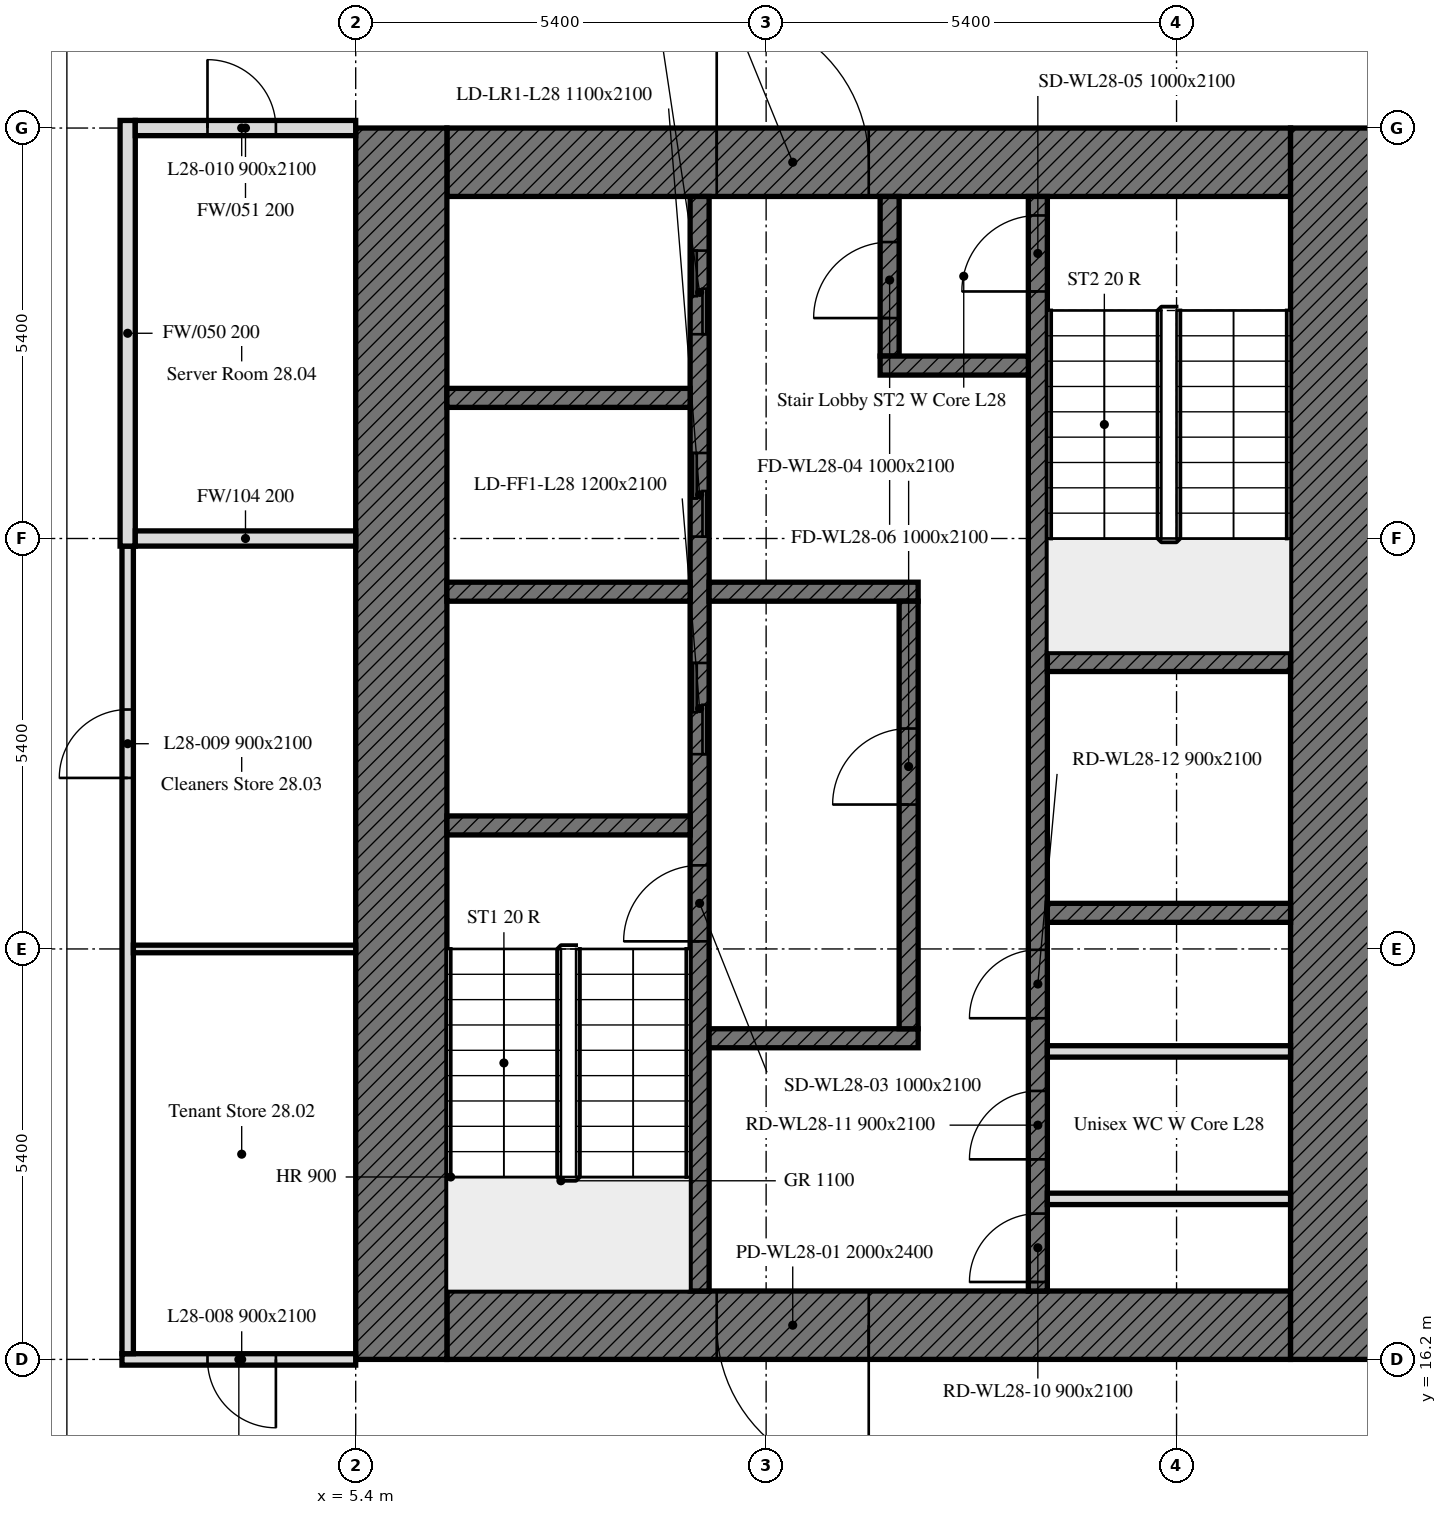
"""IFC4 building model, lengths in metres.
Left out: names, types, materials, properties, quantities, classifications, styles, units other than length and angle.
Written with IfcOpenShell. Run it as: python <this file> out.ifc"""

import sys

from ifc_helpers import new_model, si_unit, direction, frame, frame_2d, origin, place, context, subcontext, project, spatial, rectangle, extrude, element, fill, save


model = new_model("IFC4")
c1 = context("Model", 3, precision=1e-05, world=origin(), true_north=direction((0.0, 1.0)))
c2 = subcontext(c1, "Body", "Model", "MODEL_VIEW")
j1 = project(units=[si_unit("LENGTHUNIT", "METRE"), si_unit("PLANEANGLEUNIT", "RADIAN")], contexts=[c1])
p1 = place(None, origin())
s1 = spatial("IfcSite", under=j1, at=p1, CompositionType="ELEMENT")
p2 = place(p1, origin())
s2 = spatial("IfcBuilding", under=s1, at=p2, CompositionType="ELEMENT")
p3 = place(p2, frame((0.0, 0.0, 118.2)))
s3 = spatial("IfcBuildingStorey", under=s2, at=p3, CompositionType="ELEMENT", Elevation=118.2)
p4 = place(p3, frame((17.7, 16.65, 0.0), z_axis=(0.0, 0.0, 1.0), x_axis=(-1.0, 0.0, 0.0)))
e1 = element("IfcWall", 1, at=p4, inside=s3, PredefinedType="SOLIDWALL", context=c2, shape_type="SweptSolid", body=[
    extrude(rectangle(XDim=11.1, YDim=0.9, at=frame_2d((5.55, 0.0))), origin(), (0.0, 0.0, 1.0), 3.5),
])
p5 = place(p4, frame((5.55, 0.0, 0.0)))
e2 = element("IfcOpeningElement", 2, at=p5, cuts=e1, PredefinedType="OPENING", context=c2, shape_type="SweptSolid", body=[
    extrude(rectangle(XDim=2.0, YDim=2.4, at=frame_2d((1.0, 1.2))), frame((0.0, 0.45, 0.0), z_axis=(0.0, -1.0, 0.0), x_axis=(1.0, 0.0, 0.0)), (0.0, 0.0, 1.0), 0.9),
])
p6 = place(p3, frame((6.6, 31.95, 0.0), z_axis=(0.0, 0.0, 1.0), x_axis=(1.0, 0.0, 0.0)))
e3 = element("IfcWall", 3, at=p6, inside=s3, PredefinedType="SOLIDWALL", context=c2, shape_type="SweptSolid", body=[
    extrude(rectangle(XDim=11.1, YDim=0.9, at=frame_2d((5.55, 0.0))), origin(), (0.0, 0.0, 1.0), 3.5),
])
p7 = place(p6, frame((3.55, 0.0, 0.0)))
e4 = element("IfcOpeningElement", 4, at=p7, cuts=e3, PredefinedType="OPENING", context=c2, shape_type="SweptSolid", body=[
    extrude(rectangle(XDim=2.0, YDim=2.4, at=frame_2d((1.0, 1.2))), frame((0.0, 0.45, 0.0), z_axis=(0.0, -1.0, 0.0), x_axis=(1.0, 0.0, 0.0)), (0.0, 0.0, 1.0), 0.9),
])
for number, where, z_axis, x_axis in (
    (5, (6.0, 16.2, 0.0), (0.0, 0.0, 1.0), (0.0, 1.0, 0.0)),
    (6, (18.3, 32.4, 0.0), (0.0, 0.0, 1.0), (0.0, -1.0, 0.0)),
):
    element("IfcWall", number, at=place(p3, frame(where, z_axis=z_axis, x_axis=x_axis)), inside=s3, PredefinedType="SOLIDWALL", context=c2, shape_type="SweptSolid", body=[
        extrude(rectangle(XDim=16.2, YDim=1.2, at=frame_2d((8.1, 0.0))), origin(), (0.0, 0.0, 1.0), 3.5),
    ])
p8 = place(p3, frame((9.925, 17.1, 0.0), z_axis=(0.0, 0.0, 1.0), x_axis=(0.0, 1.0, 0.0)))
e7 = element("IfcWall", 7, at=p8, inside=s3, PredefinedType="SOLIDWALL", context=c2, shape_type="SweptSolid", body=[
    extrude(rectangle(XDim=14.4, YDim=0.25, at=frame_2d((7.2, 0.0))), origin(), (0.0, 0.0, 1.0), 3.5),
])
p9 = place(p8, frame((4.6, 0.0, 0.0)))
e8 = element("IfcOpeningElement", 8, at=p9, cuts=e7, PredefinedType="OPENING", context=c2, shape_type="SweptSolid", body=[
    extrude(rectangle(XDim=1.0, YDim=2.1, at=frame_2d((0.5, 1.05))), frame((0.0, 0.125, 0.0), z_axis=(0.0, -1.0, 0.0), x_axis=(1.0, 0.0, 0.0)), (0.0, 0.0, 1.0), 0.25),
])
p10 = place(p8, frame((7.062, 0.0, 0.0)))
e9 = element("IfcOpeningElement", 9, at=p10, cuts=e7, PredefinedType="OPENING", context=c2, shape_type="SweptSolid", body=[
    extrude(rectangle(XDim=1.2, YDim=2.1, at=frame_2d((0.6, 1.05))), frame((0.0, 0.125, 0.0), z_axis=(0.0, -1.0, 0.0), x_axis=(1.0, 0.0, 0.0)), (0.0, 0.0, 1.0), 0.25),
])
p11 = place(p8, frame((9.925, 0.0, 0.0)))
e10 = element("IfcOpeningElement", 10, at=p11, cuts=e7, PredefinedType="OPENING", context=c2, shape_type="SweptSolid", body=[
    extrude(rectangle(XDim=1.1, YDim=2.1, at=frame_2d((0.55, 1.05))), frame((0.0, 0.125, 0.0), z_axis=(0.0, -1.0, 0.0), x_axis=(1.0, 0.0, 0.0)), (0.0, 0.0, 1.0), 0.25),
])
p12 = place(p8, frame((12.587, 0.0, 0.0)))
e11 = element("IfcOpeningElement", 11, at=p12, cuts=e7, PredefinedType="OPENING", context=c2, shape_type="SweptSolid", body=[
    extrude(rectangle(XDim=1.1, YDim=2.1, at=frame_2d((0.55, 1.05))), frame((0.0, 0.125, 0.0), z_axis=(0.0, -1.0, 0.0), x_axis=(1.0, 0.0, 0.0)), (0.0, 0.0, 1.0), 0.25),
])
p13 = place(p3, frame((14.375, 17.1, 0.0), z_axis=(0.0, 0.0, 1.0), x_axis=(0.0, 1.0, 0.0)))
e12 = element("IfcWall", 12, at=p13, inside=s3, PredefinedType="SOLIDWALL", context=c2, shape_type="SweptSolid", body=[
    extrude(rectangle(XDim=14.4, YDim=0.25, at=frame_2d((7.2, 0.0))), origin(), (0.0, 0.0, 1.0), 3.5),
])
p14 = place(p13, frame((13.15, 0.0, 0.0)))
e13 = element("IfcOpeningElement", 13, at=p14, cuts=e12, PredefinedType="OPENING", context=c2, shape_type="SweptSolid", body=[
    extrude(rectangle(XDim=1.0, YDim=2.1, at=frame_2d((0.5, 1.05))), frame((0.0, 0.125, 0.0), z_axis=(0.0, -1.0, 0.0), x_axis=(1.0, 0.0, 0.0)), (0.0, 0.0, 1.0), 0.25),
])
p15 = place(p13, frame((0.118, 0.0, 0.0)))
e14 = element("IfcOpeningElement", 14, at=p15, cuts=e12, PredefinedType="OPENING", context=c2, shape_type="SweptSolid", body=[
    extrude(rectangle(XDim=0.9, YDim=2.1, at=frame_2d((0.45, 1.05))), frame((0.0, 0.125, 0.0), z_axis=(0.0, -1.0, 0.0), x_axis=(1.0, 0.0, 0.0)), (0.0, 0.0, 1.0), 0.25),
])
p16 = place(p13, frame((1.732, 0.0, 0.0)))
e15 = element("IfcOpeningElement", 15, at=p16, cuts=e12, PredefinedType="OPENING", context=c2, shape_type="SweptSolid", body=[
    extrude(rectangle(XDim=0.9, YDim=2.1, at=frame_2d((0.45, 1.05))), frame((0.0, 0.125, 0.0), z_axis=(0.0, -1.0, 0.0), x_axis=(1.0, 0.0, 0.0)), (0.0, 0.0, 1.0), 0.25),
])
p17 = place(p13, frame((3.588, 0.0, 0.0)))
e16 = element("IfcOpeningElement", 16, at=p17, cuts=e12, PredefinedType="OPENING", context=c2, shape_type="SweptSolid", body=[
    extrude(rectangle(XDim=0.9, YDim=2.1, at=frame_2d((0.45, 1.05))), frame((0.0, 0.125, 0.0), z_axis=(0.0, -1.0, 0.0), x_axis=(1.0, 0.0, 0.0)), (0.0, 0.0, 1.0), 0.25),
])
for number, where, z_axis, x_axis in (
    (17, (6.6, 23.225, 0.0), (0.0, 0.0, 1.0), (1.0, 0.0, 0.0)),
    (18, (14.5, 25.375, 0.0), (0.0, 0.0, 1.0), (1.0, 0.0, 0.0)),
    (19, (14.5, 22.075, 0.0), (0.0, 0.0, 1.0), (1.0, 0.0, 0.0)),
    (20, (6.6, 26.3, 0.0), (0.0, 0.0, 1.0), (1.0, 0.0, 0.0)),
):
    element("IfcWall", number, at=place(p3, frame(where, z_axis=z_axis, x_axis=x_axis)), inside=s3, PredefinedType="SOLIDWALL", context=c2, shape_type="SweptSolid", body=[
        extrude(rectangle(XDim=3.2, YDim=0.25, at=frame_2d((1.6, 0.0))), origin(), (0.0, 0.0, 1.0), 3.5),
    ])
for number, where, z_axis, x_axis in (
    (21, (10.05, 26.3, 0.0), (0.0, 0.0, 1.0), (1.0, 0.0, 0.0)),
    (22, (10.05, 20.425, 0.0), (0.0, 0.0, 1.0), (1.0, 0.0, 0.0)),
):
    element("IfcWall", number, at=place(p3, frame(where, z_axis=z_axis, x_axis=x_axis)), inside=s3, PredefinedType="SOLIDWALL", context=c2, shape_type="SweptSolid", body=[
        extrude(rectangle(XDim=2.75, YDim=0.25, at=frame_2d((1.375, 0.0))), origin(), (0.0, 0.0, 1.0), 3.5),
    ])
p18 = place(p3, frame((12.425, 29.4, 0.0), z_axis=(0.0, 0.0, 1.0), x_axis=(0.0, 1.0, 0.0)))
e23 = element("IfcWall", 23, at=p18, inside=s3, PredefinedType="SOLIDWALL", context=c2, shape_type="SweptSolid", body=[
    extrude(rectangle(XDim=2.1, YDim=0.25, at=frame_2d((1.05, 0.0))), origin(), (0.0, 0.0, 1.0), 3.5),
])
p19 = place(p18, frame((0.5, 0.0, 0.0)))
e24 = element("IfcOpeningElement", 24, at=p19, cuts=e23, PredefinedType="OPENING", context=c2, shape_type="SweptSolid", body=[
    extrude(rectangle(XDim=1.0, YDim=2.1, at=frame_2d((0.5, 1.05))), frame((0.0, 0.125, 0.0), z_axis=(0.0, -1.0, 0.0), x_axis=(1.0, 0.0, 0.0)), (0.0, 0.0, 1.0), 0.25),
])
p20 = place(p3, frame((12.3, 29.275, 0.0), z_axis=(0.0, 0.0, 1.0), x_axis=(1.0, 0.0, 0.0)))
e25 = element("IfcWall", 25, at=p20, inside=s3, PredefinedType="SOLIDWALL", context=c2, shape_type="SweptSolid", body=[
    extrude(rectangle(XDim=1.95, YDim=0.25, at=frame_2d((0.975, 0.0))), origin(), (0.0, 0.0, 1.0), 3.5),
])
p21 = place(p3, frame((12.675, 20.55, 0.0), z_axis=(0.0, 0.0, 1.0), x_axis=(0.0, 1.0, 0.0)))
e26 = element("IfcWall", 26, at=p21, inside=s3, PredefinedType="SOLIDWALL", context=c2, shape_type="SweptSolid", body=[
    extrude(rectangle(XDim=5.625, YDim=0.25, at=frame_2d((2.812, 0.0))), origin(), (0.0, 0.0, 1.0), 3.5),
])
p22 = place(p21, frame((2.95, 0.0, 0.0)))
e27 = element("IfcOpeningElement", 27, at=p22, cuts=e26, PredefinedType="OPENING", context=c2, shape_type="SweptSolid", body=[
    extrude(rectangle(XDim=1.0, YDim=2.1, at=frame_2d((0.5, 1.05))), frame((0.0, 0.125, 0.0), z_axis=(0.0, -1.0, 0.0), x_axis=(1.0, 0.0, 0.0)), (0.0, 0.0, 1.0), 0.25),
])
p23 = place(p3, frame((6.6, 28.85, 0.0), z_axis=(0.0, 0.0, 1.0), x_axis=(1.0, 0.0, 0.0)))
e28 = element("IfcWall", 28, at=p23, inside=s3, PredefinedType="SOLIDWALL", context=c2, shape_type="SweptSolid", body=[
    extrude(rectangle(XDim=3.2, YDim=0.25, at=frame_2d((1.6, 0.0))), origin(), (0.0, 0.0, 1.0), 3.5),
])
for number, where, z_axis, x_axis in (
    (29, (14.5, 18.312, 0.0), (0.0, 0.0, 1.0), (1.0, 0.0, 0.0)),
    (30, (14.5, 20.252, 0.0), (0.0, 0.0, 1.0), (1.0, 0.0, 0.0)),
):
    element("IfcWall", number, at=place(p3, frame(where, z_axis=z_axis, x_axis=x_axis)), inside=s3, PredefinedType="PARTITIONING", context=c2, shape_type="SweptSolid", body=[
        extrude(rectangle(XDim=3.2, YDim=0.15, at=frame_2d((1.6, 0.0))), origin(), (0.0, 0.0, 1.0), 3.5),
    ])
p24 = place(p3, frame((5.4, 16.2, 0.0), z_axis=(0.0, 0.0, 1.0), x_axis=(-1.0, 0.0, 0.0)))
e31 = element("IfcWall", 31, at=p24, inside=s3, PredefinedType="PARTITIONING", context=c2, shape_type="SweptSolid", body=[
    extrude(rectangle(XDim=3.075, YDim=0.15, at=frame_2d((1.538, 0.0))), origin(), (0.0, 0.0, 1.0), 2.75),
])
p25 = place(p24, frame((1.05, 0.0, 0.0)))
e32 = element("IfcOpeningElement", 32, at=p25, cuts=e31, PredefinedType="OPENING", context=c2, shape_type="SweptSolid", body=[
    extrude(rectangle(XDim=0.9, YDim=2.1, at=frame_2d((0.45, 1.05))), frame((0.0, 0.075, 0.0), z_axis=(0.0, -1.0, 0.0), x_axis=(1.0, 0.0, 0.0)), (0.0, 0.0, 1.0), 0.15),
])
p26 = place(p3, frame((2.4, 16.275, 0.0), z_axis=(0.0, 0.0, 1.0), x_axis=(0.0, 1.0, 0.0)))
e33 = element("IfcWall", 33, at=p26, inside=s3, PredefinedType="PARTITIONING", context=c2, shape_type="SweptSolid", body=[
    extrude(rectangle(XDim=10.625, YDim=0.15, at=frame_2d((5.312, 0.0))), origin(), (0.0, 0.0, 1.0), 3.5),
])
p27 = place(p26, frame((7.575, 0.0, 0.0)))
e34 = element("IfcOpeningElement", 34, at=p27, cuts=e33, PredefinedType="OPENING", context=c2, shape_type="SweptSolid", body=[
    extrude(rectangle(XDim=0.9, YDim=2.1, at=frame_2d((0.45, 1.05))), frame((0.0, 0.075, 0.0), z_axis=(0.0, -1.0, 0.0), x_axis=(1.0, 0.0, 0.0)), (0.0, 0.0, 1.0), 0.15),
])
p28 = place(p3, frame((2.4, 26.9, 0.0), z_axis=(0.0, 0.0, 1.0), x_axis=(0.0, 1.0, 0.0)))
e35 = element("IfcWall", 35, at=p28, inside=s3, PredefinedType="PARTITIONING", context=c2, shape_type="SweptSolid", body=[
    extrude(rectangle(XDim=5.6, YDim=0.2, at=frame_2d((2.8, 0.0))), origin(), (0.0, 0.0, 1.0), 3.5),
])
p29 = place(p3, frame((2.5, 32.4, 0.0), z_axis=(0.0, 0.0, 1.0), x_axis=(1.0, 0.0, 0.0)))
e36 = element("IfcWall", 36, at=p29, inside=s3, PredefinedType="PARTITIONING", context=c2, shape_type="SweptSolid", body=[
    extrude(rectangle(XDim=2.9, YDim=0.2, at=frame_2d((1.45, 0.0))), origin(), (0.0, 0.0, 1.0), 2.75),
])
p30 = place(p29, frame((0.95, 0.0, 0.0)))
e37 = element("IfcOpeningElement", 37, at=p30, cuts=e36, PredefinedType="OPENING", context=c2, shape_type="SweptSolid", body=[
    extrude(rectangle(XDim=0.9, YDim=2.1, at=frame_2d((0.45, 1.05))), frame((0.0, 0.1, 0.0), z_axis=(0.0, -1.0, 0.0), x_axis=(1.0, 0.0, 0.0)), (0.0, 0.0, 1.0), 0.2),
])
p31 = place(p3, frame((5.4, 21.6, 0.0), z_axis=(0.0, 0.0, 1.0), x_axis=(-1.0, 0.0, 0.0)))
e38 = element("IfcWall", 38, at=p31, inside=s3, PredefinedType="PARTITIONING", context=c2, shape_type="SweptSolid", body=[
    extrude(rectangle(XDim=2.925, YDim=0.1, at=frame_2d((1.462, 0.0))), origin(), (0.0, 0.0, 1.0), 2.75),
])
p32 = place(p3, frame((5.4, 27.0, 0.0), z_axis=(0.0, 0.0, 1.0), x_axis=(-1.0, 0.0, 0.0)))
e39 = element("IfcWall", 39, at=p32, inside=s3, PredefinedType="PARTITIONING", context=c2, shape_type="SweptSolid", body=[
    extrude(rectangle(XDim=2.9, YDim=0.2, at=frame_2d((1.45, 0.0))), origin(), (0.0, 0.0, 1.0), 2.75),
])
p33 = place(p5, origin())
e40 = element("IfcDoor", 40, at=p33, inside=s3, OperationType="DOUBLE_DOOR_SINGLE_SWING", PredefinedType="DOOR", context=c2, shape_type="SweptSolid", body=[
    extrude(rectangle(XDim=2.0, YDim=2.4, at=frame_2d((1.0, 1.2))), frame((0.0, 0.025, 0.0), z_axis=(0.0, -1.0, 0.0), x_axis=(1.0, 0.0, 0.0)), (0.0, 0.0, 1.0), 0.05),
])
fill(e2, e40)
p34 = place(p7, origin())
e41 = element("IfcDoor", 41, at=p34, inside=s3, OperationType="DOUBLE_DOOR_SINGLE_SWING", PredefinedType="DOOR", context=c2, shape_type="SweptSolid", body=[
    extrude(rectangle(XDim=2.0, YDim=2.4, at=frame_2d((1.0, 1.2))), frame((0.0, 0.025, 0.0), z_axis=(0.0, -1.0, 0.0), x_axis=(1.0, 0.0, 0.0)), (0.0, 0.0, 1.0), 0.05),
])
fill(e4, e41)
p35 = place(p9, origin())
e42 = element("IfcDoor", 42, at=p35, inside=s3, OperationType="SINGLE_SWING_LEFT", PredefinedType="DOOR", context=c2, shape_type="SweptSolid", body=[
    extrude(rectangle(XDim=1.0, YDim=2.1, at=frame_2d((0.5, 1.05))), frame((0.0, 0.025, 0.0), z_axis=(0.0, -1.0, 0.0), x_axis=(1.0, 0.0, 0.0)), (0.0, 0.0, 1.0), 0.05),
])
fill(e8, e42)
p36 = place(p22, origin())
e43 = element("IfcDoor", 43, at=p36, inside=s3, OperationType="SINGLE_SWING_LEFT", PredefinedType="DOOR", context=c2, shape_type="SweptSolid", body=[
    extrude(rectangle(XDim=1.0, YDim=2.1, at=frame_2d((0.5, 1.05))), frame((0.0, 0.025, 0.0), z_axis=(0.0, -1.0, 0.0), x_axis=(1.0, 0.0, 0.0)), (0.0, 0.0, 1.0), 0.05),
])
fill(e27, e43)
p37 = place(p14, origin())
e44 = element("IfcDoor", 44, at=p37, inside=s3, OperationType="SINGLE_SWING_LEFT", PredefinedType="DOOR", context=c2, shape_type="SweptSolid", body=[
    extrude(rectangle(XDim=1.0, YDim=2.1, at=frame_2d((0.5, 1.05))), frame((0.0, 0.025, 0.0), z_axis=(0.0, -1.0, 0.0), x_axis=(1.0, 0.0, 0.0)), (0.0, 0.0, 1.0), 0.05),
])
fill(e13, e44)
p38 = place(p19, origin())
e45 = element("IfcDoor", 45, at=p38, inside=s3, OperationType="SINGLE_SWING_LEFT", PredefinedType="DOOR", context=c2, shape_type="SweptSolid", body=[
    extrude(rectangle(XDim=1.0, YDim=2.1, at=frame_2d((0.5, 1.05))), frame((0.0, 0.025, 0.0), z_axis=(0.0, -1.0, 0.0), x_axis=(1.0, 0.0, 0.0)), (0.0, 0.0, 1.0), 0.05),
])
fill(e24, e45)
p39 = place(p10, origin())
e46 = element("IfcDoor", 46, at=p39, inside=s3, OperationType="DOUBLE_DOOR_SLIDING", PredefinedType="DOOR", context=c2, shape_type="SweptSolid", body=[
    extrude(rectangle(XDim=1.2, YDim=2.1, at=frame_2d((0.6, 1.05))), frame((0.0, 0.025, 0.0), z_axis=(0.0, -1.0, 0.0), x_axis=(1.0, 0.0, 0.0)), (0.0, 0.0, 1.0), 0.05),
])
fill(e9, e46)
p40 = place(p11, origin())
e47 = element("IfcDoor", 47, at=p40, inside=s3, OperationType="DOUBLE_DOOR_SLIDING", PredefinedType="DOOR", context=c2, shape_type="SweptSolid", body=[
    extrude(rectangle(XDim=1.1, YDim=2.1, at=frame_2d((0.55, 1.05))), frame((0.0, 0.025, 0.0), z_axis=(0.0, -1.0, 0.0), x_axis=(1.0, 0.0, 0.0)), (0.0, 0.0, 1.0), 0.05),
])
fill(e10, e47)
p41 = place(p12, origin())
e48 = element("IfcDoor", 48, at=p41, inside=s3, OperationType="DOUBLE_DOOR_SLIDING", PredefinedType="DOOR", context=c2, shape_type="SweptSolid", body=[
    extrude(rectangle(XDim=1.1, YDim=2.1, at=frame_2d((0.55, 1.05))), frame((0.0, 0.025, 0.0), z_axis=(0.0, -1.0, 0.0), x_axis=(1.0, 0.0, 0.0)), (0.0, 0.0, 1.0), 0.05),
])
fill(e11, e48)
p42 = place(p15, origin())
e49 = element("IfcDoor", 49, at=p42, inside=s3, OperationType="SINGLE_SWING_LEFT", PredefinedType="DOOR", context=c2, shape_type="SweptSolid", body=[
    extrude(rectangle(XDim=0.9, YDim=2.1, at=frame_2d((0.45, 1.05))), frame((0.0, 0.025, 0.0), z_axis=(0.0, -1.0, 0.0), x_axis=(1.0, 0.0, 0.0)), (0.0, 0.0, 1.0), 0.05),
])
fill(e14, e49)
p43 = place(p16, origin())
e50 = element("IfcDoor", 50, at=p43, inside=s3, OperationType="SINGLE_SWING_LEFT", PredefinedType="DOOR", context=c2, shape_type="SweptSolid", body=[
    extrude(rectangle(XDim=0.9, YDim=2.1, at=frame_2d((0.45, 1.05))), frame((0.0, 0.025, 0.0), z_axis=(0.0, -1.0, 0.0), x_axis=(1.0, 0.0, 0.0)), (0.0, 0.0, 1.0), 0.05),
])
fill(e15, e50)
p44 = place(p17, origin())
e51 = element("IfcDoor", 51, at=p44, inside=s3, OperationType="SINGLE_SWING_LEFT", PredefinedType="DOOR", context=c2, shape_type="SweptSolid", body=[
    extrude(rectangle(XDim=0.9, YDim=2.1, at=frame_2d((0.45, 1.05))), frame((0.0, 0.025, 0.0), z_axis=(0.0, -1.0, 0.0), x_axis=(1.0, 0.0, 0.0)), (0.0, 0.0, 1.0), 0.05),
])
fill(e16, e51)
p45 = place(p25, origin())
e52 = element("IfcDoor", 52, at=p45, inside=s3, OperationType="SINGLE_SWING_RIGHT", PredefinedType="DOOR", context=c2, shape_type="SweptSolid", body=[
    extrude(rectangle(XDim=0.9, YDim=2.1, at=frame_2d((0.45, 1.05))), frame((0.0, 0.025, 0.0), z_axis=(0.0, -1.0, 0.0), x_axis=(1.0, 0.0, 0.0)), (0.0, 0.0, 1.0), 0.05),
])
fill(e32, e52)
p46 = place(p27, origin())
e53 = element("IfcDoor", 53, at=p46, inside=s3, OperationType="SINGLE_SWING_RIGHT", PredefinedType="DOOR", context=c2, shape_type="SweptSolid", body=[
    extrude(rectangle(XDim=0.9, YDim=2.1, at=frame_2d((0.45, 1.05))), frame((0.0, 0.025, 0.0), z_axis=(0.0, -1.0, 0.0), x_axis=(1.0, 0.0, 0.0)), (0.0, 0.0, 1.0), 0.05),
])
fill(e34, e53)
p47 = place(p30, origin())
e54 = element("IfcDoor", 54, at=p47, inside=s3, OperationType="SINGLE_SWING_RIGHT", PredefinedType="DOOR", context=c2, shape_type="SweptSolid", body=[
    extrude(rectangle(XDim=0.9, YDim=2.1, at=frame_2d((0.45, 1.05))), frame((0.0, 0.025, 0.0), z_axis=(0.0, -1.0, 0.0), x_axis=(1.0, 0.0, 0.0)), (0.0, 0.0, 1.0), 0.05),
])
fill(e37, e54)
save(model, sys.argv[1])
